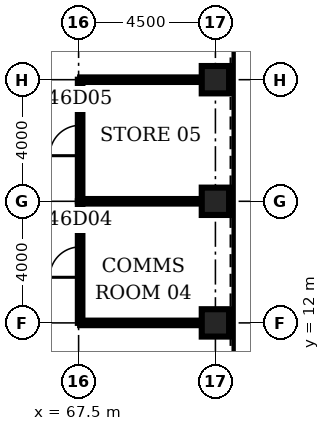
"""IFC4 building model, lengths in metres.
Left out: names, types, materials, properties, quantities, classifications, styles, units other than length and angle.
Written with IfcOpenShell. Run it as: python <this file> out.ifc"""

import sys

from ifc_helpers import new_model, si_unit, direction, frame, frame_2d, origin, origin_2d, place, context, subcontext, project, spatial, rectangle, hollow_rectangle, extrude, element, fill, save


model = new_model("IFC4")
c1 = context("Model", 3, precision=1e-05, world=origin(), true_north=direction((0.0, 1.0)))
c2 = subcontext(c1, "Body", "Model", "MODEL_VIEW")
j1 = project(units=[si_unit("LENGTHUNIT", "METRE"), si_unit("PLANEANGLEUNIT", "RADIAN")], contexts=[c1])
p1 = place(None, origin())
s1 = spatial("IfcSite", under=j1, at=p1, CompositionType="ELEMENT")
p2 = place(p1, origin())
s2 = spatial("IfcBuilding", under=s1, at=p2, CompositionType="ELEMENT")
p3 = place(p2, frame((0.0, 0.0, 206.8)))
s3 = spatial("IfcBuildingStorey", under=s2, at=p3, CompositionType="ELEMENT", Elevation=206.8)
for number, where, z_axis, x_axis in (
    (1, (72.0, 12.0, 0.0), (0.0, 0.0, 1.0), (1.0, 0.0, 0.0)),
    (2, (72.0, 16.0, 0.0), (0.0, 0.0, 1.0), (1.0, 0.0, 0.0)),
    (3, (72.0, 20.0, 0.0), (0.0, 0.0, 1.0), (1.0, 0.0, 0.0)),
):
    element("IfcColumn", number, at=place(p3, frame(where, z_axis=z_axis, x_axis=x_axis)), inside=s3, PredefinedType="COLUMN", context=c2, shape_type="SweptSolid", body=[
        extrude(hollow_rectangle(XDim=0.9, YDim=0.9, WallThickness=0.08, at=origin_2d()), origin(), (0.0, 0.0, 1.0), 4.2),
    ])
for number, where, z_axis, x_axis in (
    (4, (67.55, 12.0, 0.0), (0.0, 0.0, 1.0), (1.0, 0.0, 0.0)),
    (5, (67.55, 16.0, 0.0), (0.0, 0.0, 1.0), (1.0, 0.0, 0.0)),
    (6, (67.55, 20.0, 0.0), (0.0, 0.0, 1.0), (1.0, 0.0, 0.0)),
):
    element("IfcWall", number, at=place(p3, frame(where, z_axis=z_axis, x_axis=x_axis)), inside=s3, PredefinedType="PARTITIONING", context=c2, shape_type="SweptSolid", body=[
        extrude(rectangle(XDim=4.0, YDim=0.15, at=frame_2d((2.0, 0.0))), origin(), (0.0, 0.0, 1.0), 3.0),
    ])
p4 = place(p3, frame((67.55, 12.0, 0.0), z_axis=(0.0, 0.0, 1.0), x_axis=(0.0, 1.0, 0.0)))
e7 = element("IfcWall", 7, at=p4, inside=s3, PredefinedType="PARTITIONING", context=c2, shape_type="SweptSolid", body=[
    extrude(rectangle(XDim=4.0, YDim=0.15, at=frame_2d((2.0, 0.0))), origin(), (0.0, 0.0, 1.0), 3.0),
])
p5 = place(p4, frame((1.5, 0.0, 0.0)))
e8 = element("IfcOpeningElement", 8, at=p5, cuts=e7, PredefinedType="OPENING", context=c2, shape_type="SweptSolid", body=[
    extrude(rectangle(XDim=1.0, YDim=2.1, at=frame_2d((0.5, 1.05))), frame((0.0, 0.085, 0.0), z_axis=(0.0, -1.0, 0.0), x_axis=(1.0, 0.0, 0.0)), (0.0, 0.0, 1.0), 0.17),
])
p6 = place(p3, frame((67.55, 16.0, 0.0), z_axis=(0.0, 0.0, 1.0), x_axis=(0.0, 1.0, 0.0)))
e9 = element("IfcWall", 9, at=p6, inside=s3, PredefinedType="PARTITIONING", context=c2, shape_type="SweptSolid", body=[
    extrude(rectangle(XDim=4.0, YDim=0.15, at=frame_2d((2.0, 0.0))), origin(), (0.0, 0.0, 1.0), 3.0),
])
p7 = place(p6, frame((1.5, 0.0, 0.0)))
e10 = element("IfcOpeningElement", 10, at=p7, cuts=e9, PredefinedType="OPENING", context=c2, shape_type="SweptSolid", body=[
    extrude(rectangle(XDim=1.0, YDim=2.1, at=frame_2d((0.5, 1.05))), frame((0.0, 0.085, 0.0), z_axis=(0.0, -1.0, 0.0), x_axis=(1.0, 0.0, 0.0)), (0.0, 0.0, 1.0), 0.17),
])
p8 = place(p5, origin())
e11 = element("IfcDoor", 11, at=p8, inside=s3, OperationType="SINGLE_SWING_LEFT", PredefinedType="DOOR", context=c2, shape_type="SweptSolid", body=[
    extrude(rectangle(XDim=1.0, YDim=2.1, at=frame_2d((0.5, 1.05))), frame((0.0, 0.025, 0.0), z_axis=(0.0, -1.0, 0.0), x_axis=(1.0, 0.0, 0.0)), (0.0, 0.0, 1.0), 0.05),
])
fill(e8, e11)
p9 = place(p7, origin())
e12 = element("IfcDoor", 12, at=p9, inside=s3, OperationType="SINGLE_SWING_LEFT", PredefinedType="DOOR", context=c2, shape_type="SweptSolid", body=[
    extrude(rectangle(XDim=1.0, YDim=2.1, at=frame_2d((0.5, 1.05))), frame((0.0, 0.025, 0.0), z_axis=(0.0, -1.0, 0.0), x_axis=(1.0, 0.0, 0.0)), (0.0, 0.0, 1.0), 0.05),
])
fill(e10, e12)
save(model, sys.argv[1])
